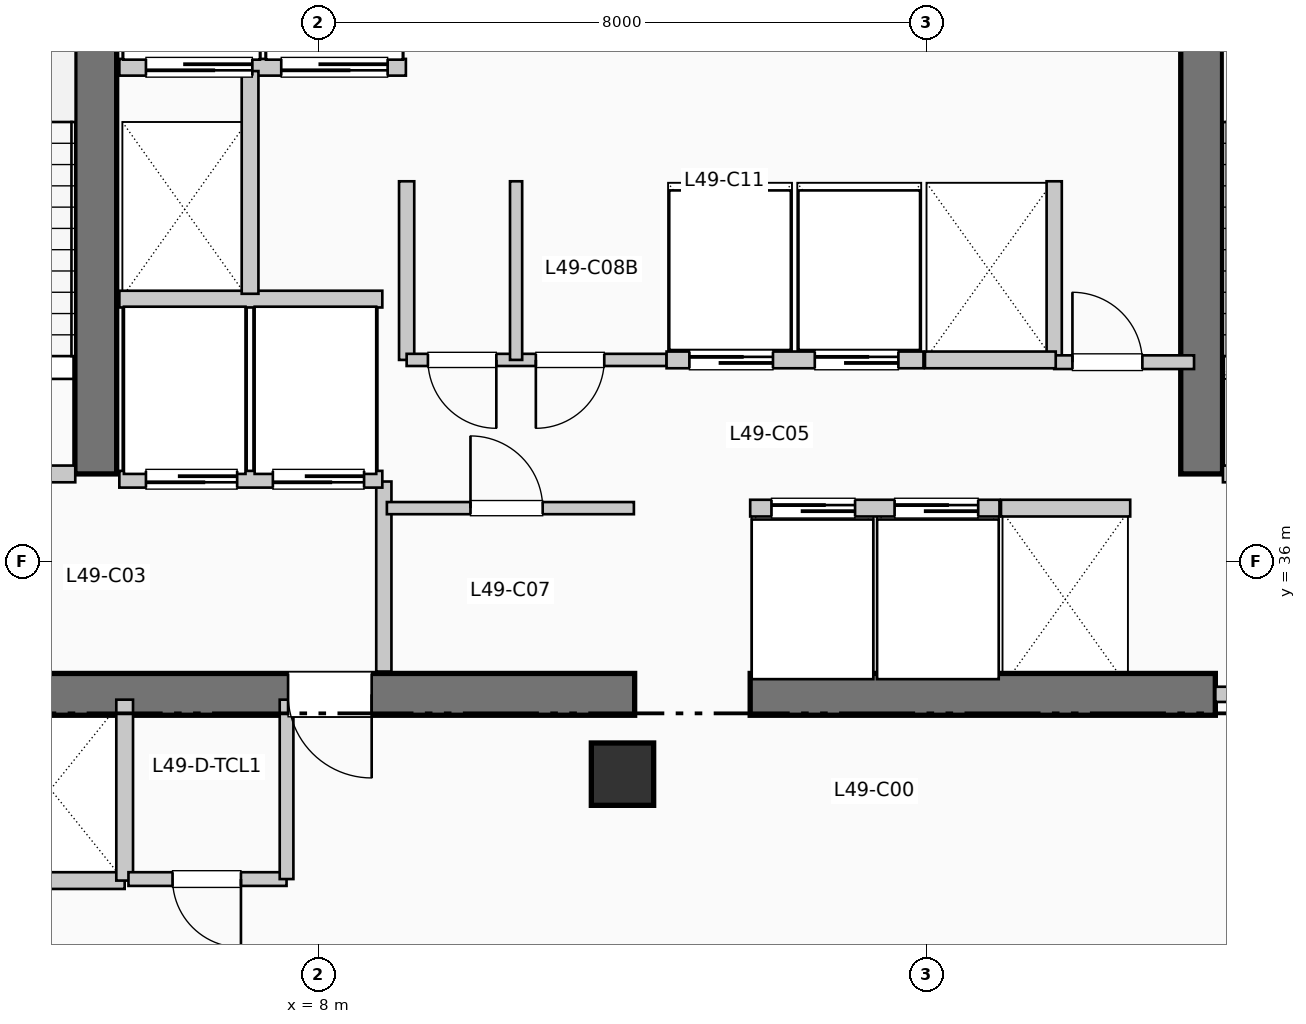
"""IFC4 building model, lengths in metres.
Left out: names, types, materials, properties, quantities, classifications, styles, units other than length and angle.
Written with IfcOpenShell. Run it as: python <this file> out.ifc"""

import sys

from ifc_helpers import new_model, si_unit, direction, frame, frame_2d, origin, origin_2d, place, context, subcontext, project, spatial, rectangle, extrude, element, fill, save


model = new_model("IFC4")
c1 = context("Model", 3, precision=1e-05, world=origin(), true_north=direction((0.0, 1.0)))
c2 = subcontext(c1, "Body", "Model", "MODEL_VIEW")
j1 = project(units=[si_unit("LENGTHUNIT", "METRE"), si_unit("PLANEANGLEUNIT", "RADIAN")], contexts=[c1])
p1 = place(None, origin())
s1 = spatial("IfcSite", under=j1, at=p1, CompositionType="ELEMENT")
p2 = place(p1, origin())
s2 = spatial("IfcBuilding", under=s1, at=p2, CompositionType="ELEMENT")
p3 = place(p2, frame((0.0, 0.0, 203.28)))
s3 = spatial("IfcBuildingStorey", under=s2, at=p3, CompositionType="ELEMENT", Elevation=203.28)
p4 = place(p3, frame((1.45, 34.25, 0.0), z_axis=(0.0, 0.0, 1.0), x_axis=(1.0, 0.0, 0.0)))
e1 = element("IfcWall", 1, at=p4, inside=s3, PredefinedType="SHEAR", context=c2, shape_type="SweptSolid", body=[
    extrude(rectangle(XDim=10.71, YDim=0.55, at=frame_2d((5.355, 0.0))), origin(), (0.0, 0.0, 1.0), 3.96),
])
p5 = place(p4, frame((7.25, 0.0, 0.0), z_axis=(0.0, 0.0, 1.0), x_axis=(-1.0, 0.0, 0.0)))
e2 = element("IfcOpeningElement", 2, at=p5, cuts=e1, PredefinedType="OPENING", context=c2, shape_type="SweptSolid", body=[
    extrude(rectangle(XDim=1.1, YDim=2.15, at=frame_2d((0.55, 1.075))), frame((0.0, 0.285, 0.0), z_axis=(0.0, -1.0, 0.0), x_axis=(1.0, 0.0, 0.0)), (0.0, 0.0, 1.0), 0.57),
])
p6 = place(p3, frame((13.68, 34.25, 0.0), z_axis=(0.0, 0.0, 1.0), x_axis=(1.0, 0.0, 0.0)))
e3 = element("IfcWall", 3, at=p6, inside=s3, PredefinedType="SHEAR", context=c2, shape_type="SweptSolid", body=[
    extrude(rectangle(XDim=6.12, YDim=0.55, at=frame_2d((3.06, 0.0))), origin(), (0.0, 0.0, 1.0), 3.96),
])
for number, where, z_axis, x_axis in (
    (4, (5.07, 37.15, 0.0), (0.0, 0.0, 1.0), (0.0, 1.0, 0.0)),
    (5, (19.62, 37.15, 0.0), (0.0, 0.0, 1.0), (0.0, 1.0, 0.0)),
):
    element("IfcWall", number, at=place(p3, frame(where, z_axis=z_axis, x_axis=x_axis)), inside=s3, PredefinedType="SHEAR", context=c2, shape_type="SweptSolid", body=[
        extrude(rectangle(XDim=7.89, YDim=0.55, at=frame_2d((3.945, 0.0))), origin(), (0.0, 0.0, 1.0), 3.96),
    ])
p7 = place(p3, frame((12.0, 33.2, 0.0), z_axis=(0.0, 0.0, 1.0), x_axis=(1.0, 0.0, 0.0)))
e6 = element("IfcColumn", 6, at=p7, inside=s3, PredefinedType="COLUMN", context=c2, shape_type="SweptSolid", body=[
    extrude(rectangle(XDim=0.82, YDim=0.82, at=origin_2d()), origin(), (0.0, 0.0, 1.0), 3.96),
])
p8 = place(p3, frame((1.65, 37.15, 0.0), z_axis=(0.0, 0.0, 1.0), x_axis=(1.0, 0.0, 0.0)))
e7 = element("IfcWall", 7, at=p8, inside=s3, PredefinedType="PARTITIONING", context=c2, shape_type="SweptSolid", body=[
    extrude(rectangle(XDim=3.15, YDim=0.22, at=frame_2d((1.575, 0.0))), origin(), (0.0, 0.0, 1.0), 3.71),
])
p9 = place(p8, frame((2.05, 0.0, 0.0), z_axis=(0.0, 0.0, 1.0), x_axis=(-1.0, 0.0, 0.0)))
e8 = element("IfcOpeningElement", 8, at=p9, cuts=e7, PredefinedType="OPENING", context=c2, shape_type="SweptSolid", body=[
    extrude(rectangle(XDim=1.05, YDim=2.15, at=frame_2d((0.525, 1.075))), frame((0.0, 0.12, 0.0), z_axis=(0.0, -1.0, 0.0), x_axis=(1.0, 0.0, 0.0)), (0.0, 0.0, 1.0), 0.24),
])
p10 = place(p3, frame((8.86, 34.55, 0.0), z_axis=(0.0, 0.0, 1.0), x_axis=(0.0, 1.0, 0.0)))
e9 = element("IfcWall", 9, at=p10, inside=s3, PredefinedType="PARTITIONING", context=c2, shape_type="SweptSolid", body=[
    extrude(rectangle(XDim=2.5, YDim=0.2, at=frame_2d((1.25, 0.0))), origin(), (0.0, 0.0, 1.0), 3.71),
])
p11 = place(p3, frame((19.9, 37.15, 0.0), z_axis=(0.0, 0.0, 1.0), x_axis=(1.0, 0.0, 0.0)))
e10 = element("IfcWall", 10, at=p11, inside=s3, PredefinedType="PARTITIONING", context=c2, shape_type="SweptSolid", body=[
    extrude(rectangle(XDim=3.15, YDim=0.22, at=frame_2d((1.575, 0.0))), origin(), (0.0, 0.0, 1.0), 3.71),
])
p12 = place(p11, frame((2.05, 0.0, 0.0), z_axis=(0.0, 0.0, 1.0), x_axis=(-1.0, 0.0, 0.0)))
e11 = element("IfcOpeningElement", 11, at=p12, cuts=e10, PredefinedType="OPENING", context=c2, shape_type="SweptSolid", body=[
    extrude(rectangle(XDim=1.05, YDim=2.15, at=frame_2d((0.525, 1.075))), frame((0.0, 0.12, 0.0), z_axis=(0.0, -1.0, 0.0), x_axis=(1.0, 0.0, 0.0)), (0.0, 0.0, 1.0), 0.24),
])
p13 = place(p3, frame((19.8, 34.25, 0.0), z_axis=(0.0, 0.0, 1.0), x_axis=(1.0, 0.0, 0.0)))
e12 = element("IfcWall", 12, at=p13, inside=s3, PredefinedType="PARTITIONING", context=c2, shape_type="SweptSolid", body=[
    extrude(rectangle(XDim=3.25, YDim=0.2, at=frame_2d((1.625, 0.0))), origin(), (0.0, 0.0, 1.0), 3.71),
])
p14 = place(p13, frame((2.15, 0.0, 0.0), z_axis=(0.0, 0.0, 1.0), x_axis=(-1.0, 0.0, 0.0)))
e13 = element("IfcOpeningElement", 13, at=p14, cuts=e12, PredefinedType="OPENING", context=c2, shape_type="SweptSolid", body=[
    extrude(rectangle(XDim=1.1, YDim=2.15, at=frame_2d((0.55, 1.075))), frame((0.0, 0.11, 0.0), z_axis=(0.0, -1.0, 0.0), x_axis=(1.0, 0.0, 0.0)), (0.0, 0.0, 1.0), 0.22),
])
p15 = place(p3, frame((5.38, 37.08, 0.0), z_axis=(0.0, 0.0, 1.0), x_axis=(1.0, 0.0, 0.0)))
e14 = element("IfcWall", 14, at=p15, inside=s3, PredefinedType="PARTITIONING", context=c2, shape_type="SweptSolid", body=[
    extrude(rectangle(XDim=3.46, YDim=0.22, at=frame_2d((1.73, 0.0))), origin(), (0.0, 0.0, 1.0), 3.71),
])
p16 = place(p15, frame((1.55, 0.0, 0.0), z_axis=(0.0, 0.0, 1.0), x_axis=(-1.0, 0.0, 0.0)))
e15 = element("IfcOpeningElement", 15, at=p16, cuts=e14, PredefinedType="OPENING", context=c2, shape_type="SweptSolid", body=[
    extrude(rectangle(XDim=1.2, YDim=2.2, at=frame_2d((0.6, 1.1))), frame((0.0, 0.12, 0.0), z_axis=(0.0, -1.0, 0.0), x_axis=(1.0, 0.0, 0.0)), (0.0, 0.0, 1.0), 0.24),
])
p17 = place(p15, frame((3.22, 0.0, 0.0), z_axis=(0.0, 0.0, 1.0), x_axis=(-1.0, 0.0, 0.0)))
e16 = element("IfcOpeningElement", 16, at=p17, cuts=e14, PredefinedType="OPENING", context=c2, shape_type="SweptSolid", body=[
    extrude(rectangle(XDim=1.2, YDim=2.2, at=frame_2d((0.6, 1.1))), frame((0.0, 0.12, 0.0), z_axis=(0.0, -1.0, 0.0), x_axis=(1.0, 0.0, 0.0)), (0.0, 0.0, 1.0), 0.24),
])
p18 = place(p3, frame((5.38, 39.45, 0.0), z_axis=(0.0, 0.0, 1.0), x_axis=(1.0, 0.0, 0.0)))
e17 = element("IfcWall", 17, at=p18, inside=s3, PredefinedType="PARTITIONING", context=c2, shape_type="SweptSolid", body=[
    extrude(rectangle(XDim=3.46, YDim=0.22, at=frame_2d((1.73, 0.0))), origin(), (0.0, 0.0, 1.0), 3.71),
])
p19 = place(p3, frame((5.38, 42.5, 0.0), z_axis=(0.0, 0.0, 1.0), x_axis=(1.0, 0.0, 0.0)))
e18 = element("IfcWall", 18, at=p19, inside=s3, PredefinedType="PARTITIONING", context=c2, shape_type="SweptSolid", body=[
    extrude(rectangle(XDim=3.77, YDim=0.22, at=frame_2d((1.885, 0.0))), origin(), (0.0, 0.0, 1.0), 3.71),
])
p20 = place(p19, frame((1.75, 0.0, 0.0), z_axis=(0.0, 0.0, 1.0), x_axis=(-1.0, 0.0, 0.0)))
e19 = element("IfcOpeningElement", 19, at=p20, cuts=e18, PredefinedType="OPENING", context=c2, shape_type="SweptSolid", body=[
    extrude(rectangle(XDim=1.4, YDim=2.2, at=frame_2d((0.7, 1.1))), frame((0.0, 0.12, 0.0), z_axis=(0.0, -1.0, 0.0), x_axis=(1.0, 0.0, 0.0)), (0.0, 0.0, 1.0), 0.24),
])
p21 = place(p19, frame((3.53, 0.0, 0.0), z_axis=(0.0, 0.0, 1.0), x_axis=(-1.0, 0.0, 0.0)))
e20 = element("IfcOpeningElement", 20, at=p21, cuts=e18, PredefinedType="OPENING", context=c2, shape_type="SweptSolid", body=[
    extrude(rectangle(XDim=1.4, YDim=2.2, at=frame_2d((0.7, 1.1))), frame((0.0, 0.12, 0.0), z_axis=(0.0, -1.0, 0.0), x_axis=(1.0, 0.0, 0.0)), (0.0, 0.0, 1.0), 0.24),
])
p22 = place(p3, frame((7.1, 39.52, 0.0), z_axis=(0.0, 0.0, 1.0), x_axis=(0.0, 1.0, 0.0)))
e21 = element("IfcWall", 21, at=p22, inside=s3, PredefinedType="PARTITIONING", context=c2, shape_type="SweptSolid", body=[
    extrude(rectangle(XDim=2.93, YDim=0.22, at=frame_2d((1.465, 0.0))), origin(), (0.0, 0.0, 1.0), 3.71),
])
p23 = place(p3, frame((1.55, 31.8, 0.0), z_axis=(0.0, 0.0, 1.0), x_axis=(1.0, 0.0, 0.0)))
e22 = element("IfcWall", 22, at=p23, inside=s3, PredefinedType="PARTITIONING", context=c2, shape_type="SweptSolid", body=[
    extrude(rectangle(XDim=3.9, YDim=0.22, at=frame_2d((1.95, 0.0))), origin(), (0.0, 0.0, 1.0), 3.71),
])
p24 = place(p3, frame((5.45, 31.8, 0.0), z_axis=(0.0, 0.0, 1.0), x_axis=(0.0, 1.0, 0.0)))
e23 = element("IfcWall", 23, at=p24, inside=s3, PredefinedType="PARTITIONING", context=c2, shape_type="SweptSolid", body=[
    extrude(rectangle(XDim=2.38, YDim=0.22, at=frame_2d((1.19, 0.0))), origin(), (0.0, 0.0, 1.0), 3.71),
])
for number, where, z_axis, x_axis in (
    (24, (9.16, 38.65, 0.0), (0.0, 0.0, 1.0), (0.0, 1.0, 0.0)),
    (25, (17.68, 38.65, 0.0), (0.0, 0.0, 1.0), (0.0, 1.0, 0.0)),
):
    element("IfcWall", number, at=place(p3, frame(where, z_axis=z_axis, x_axis=x_axis)), inside=s3, PredefinedType="PARTITIONING", context=c2, shape_type="SweptSolid", body=[
        extrude(rectangle(XDim=2.35, YDim=0.2, at=frame_2d((1.175, 0.0))), origin(), (0.0, 0.0, 1.0), 3.71),
    ])
p25 = place(p3, frame((17.68, 38.62, 0.0), z_axis=(0.0, 0.0, 1.0), x_axis=(1.0, 0.0, 0.0)))
e26 = element("IfcWall", 26, at=p25, inside=s3, PredefinedType="PARTITIONING", context=c2, shape_type="SweptSolid", body=[
    extrude(rectangle(XDim=1.84, YDim=0.18, at=frame_2d((0.92, 0.0))), origin(), (0.0, 0.0, 1.0), 3.71),
])
p26 = place(p25, frame((0.24, 0.0, 0.0)))
e27 = element("IfcOpeningElement", 27, at=p26, cuts=e26, PredefinedType="OPENING", context=c2, shape_type="SweptSolid", body=[
    extrude(rectangle(XDim=0.92, YDim=2.1, at=frame_2d((0.46, 1.05))), frame((0.0, 0.1, 0.0), z_axis=(0.0, -1.0, 0.0), x_axis=(1.0, 0.0, 0.0)), (0.0, 0.0, 1.0), 0.2),
])
p27 = place(p3, frame((5.5, 31.82, 0.0), z_axis=(0.0, 0.0, 1.0), x_axis=(1.0, 0.0, 0.0)))
e28 = element("IfcWall", 28, at=p27, inside=s3, PredefinedType="PLUMBINGWALL", context=c2, shape_type="SweptSolid", body=[
    extrude(rectangle(XDim=2.08, YDim=0.18, at=frame_2d((1.04, 0.0))), origin(), (0.0, 0.0, 1.0), 3.71),
])
p28 = place(p27, frame((1.48, 0.0, 0.0), z_axis=(0.0, 0.0, 1.0), x_axis=(-1.0, 0.0, 0.0)))
e29 = element("IfcOpeningElement", 29, at=p28, cuts=e28, PredefinedType="OPENING", context=c2, shape_type="SweptSolid", body=[
    extrude(rectangle(XDim=0.9, YDim=2.1, at=frame_2d((0.45, 1.05))), frame((0.0, 0.1, 0.0), z_axis=(0.0, -1.0, 0.0), x_axis=(1.0, 0.0, 0.0)), (0.0, 0.0, 1.0), 0.2),
])
p29 = place(p3, frame((7.58, 31.82, 0.0), z_axis=(0.0, 0.0, 1.0), x_axis=(0.0, 1.0, 0.0)))
e30 = element("IfcWall", 30, at=p29, inside=s3, PredefinedType="PLUMBINGWALL", context=c2, shape_type="SweptSolid", body=[
    extrude(rectangle(XDim=2.36, YDim=0.18, at=frame_2d((1.18, 0.0))), origin(), (0.0, 0.0, 1.0), 3.71),
])
p30 = place(p3, frame((8.9, 36.7, 0.0), z_axis=(0.0, 0.0, 1.0), x_axis=(1.0, 0.0, 0.0)))
e31 = element("IfcWall", 31, at=p30, inside=s3, PredefinedType="PARTITIONING", context=c2, shape_type="SweptSolid", body=[
    extrude(rectangle(XDim=3.25, YDim=0.16, at=frame_2d((1.625, 0.0))), origin(), (0.0, 0.0, 1.0), 3.71),
])
p31 = place(p30, frame((1.1, 0.0, 0.0)))
e32 = element("IfcOpeningElement", 32, at=p31, cuts=e31, PredefinedType="OPENING", context=c2, shape_type="SweptSolid", body=[
    extrude(rectangle(XDim=0.95, YDim=2.15, at=frame_2d((0.475, 1.075))), frame((0.0, 0.09, 0.0), z_axis=(0.0, -1.0, 0.0), x_axis=(1.0, 0.0, 0.0)), (0.0, 0.0, 1.0), 0.18),
])
p32 = place(p3, frame((9.16, 38.65, 0.0), z_axis=(0.0, 0.0, 1.0), x_axis=(1.0, 0.0, 0.0)))
e33 = element("IfcWall", 33, at=p32, inside=s3, PredefinedType="PARTITIONING", context=c2, shape_type="SweptSolid", body=[
    extrude(rectangle(XDim=3.42, YDim=0.16, at=frame_2d((1.71, 0.0))), origin(), (0.0, 0.0, 1.0), 3.71),
])
p33 = place(p32, frame((1.18, 0.0, 0.0), z_axis=(0.0, 0.0, 1.0), x_axis=(-1.0, 0.0, 0.0)))
e34 = element("IfcOpeningElement", 34, at=p33, cuts=e33, PredefinedType="OPENING", context=c2, shape_type="SweptSolid", body=[
    extrude(rectangle(XDim=0.9, YDim=2.15, at=frame_2d((0.45, 1.075))), frame((0.0, 0.09, 0.0), z_axis=(0.0, -1.0, 0.0), x_axis=(1.0, 0.0, 0.0)), (0.0, 0.0, 1.0), 0.18),
])
p34 = place(p32, frame((2.6, 0.0, 0.0), z_axis=(0.0, 0.0, 1.0), x_axis=(-1.0, 0.0, 0.0)))
e35 = element("IfcOpeningElement", 35, at=p34, cuts=e33, PredefinedType="OPENING", context=c2, shape_type="SweptSolid", body=[
    extrude(rectangle(XDim=0.9, YDim=2.15, at=frame_2d((0.45, 1.075))), frame((0.0, 0.09, 0.0), z_axis=(0.0, -1.0, 0.0), x_axis=(1.0, 0.0, 0.0)), (0.0, 0.0, 1.0), 0.18),
])
p35 = place(p3, frame((10.6, 38.65, 0.0), z_axis=(0.0, 0.0, 1.0), x_axis=(0.0, 1.0, 0.0)))
e36 = element("IfcWall", 36, at=p35, inside=s3, PredefinedType="PARTITIONING", context=c2, shape_type="SweptSolid", body=[
    extrude(rectangle(XDim=2.35, YDim=0.16, at=frame_2d((1.175, 0.0))), origin(), (0.0, 0.0, 1.0), 3.71),
])
p36 = place(p3, frame((13.68, 36.7, 0.0), z_axis=(0.0, 0.0, 1.0), x_axis=(1.0, 0.0, 0.0)))
e37 = element("IfcWall", 37, at=p36, inside=s3, PredefinedType="PARTITIONING", context=c2, shape_type="SweptSolid", body=[
    extrude(rectangle(XDim=3.28, YDim=0.22, at=frame_2d((1.64, 0.0))), origin(), (0.0, 0.0, 1.0), 3.71),
])
p37 = place(p36, frame((0.28, 0.0, 0.0)))
e38 = element("IfcOpeningElement", 38, at=p37, cuts=e37, PredefinedType="OPENING", context=c2, shape_type="SweptSolid", body=[
    extrude(rectangle(XDim=1.1, YDim=2.2, at=frame_2d((0.55, 1.1))), frame((0.0, 0.12, 0.0), z_axis=(0.0, -1.0, 0.0), x_axis=(1.0, 0.0, 0.0)), (0.0, 0.0, 1.0), 0.24),
])
p38 = place(p36, frame((1.9, 0.0, 0.0)))
e39 = element("IfcOpeningElement", 39, at=p38, cuts=e37, PredefinedType="OPENING", context=c2, shape_type="SweptSolid", body=[
    extrude(rectangle(XDim=1.1, YDim=2.2, at=frame_2d((0.55, 1.1))), frame((0.0, 0.12, 0.0), z_axis=(0.0, -1.0, 0.0), x_axis=(1.0, 0.0, 0.0)), (0.0, 0.0, 1.0), 0.24),
])
p39 = place(p3, frame((12.58, 38.65, 0.0), z_axis=(0.0, 0.0, 1.0), x_axis=(1.0, 0.0, 0.0)))
e40 = element("IfcWall", 40, at=p39, inside=s3, PredefinedType="PARTITIONING", context=c2, shape_type="SweptSolid", body=[
    extrude(rectangle(XDim=3.38, YDim=0.22, at=frame_2d((1.69, 0.0))), origin(), (0.0, 0.0, 1.0), 3.71),
])
p40 = place(p39, frame((0.3, 0.0, 0.0)))
e41 = element("IfcOpeningElement", 41, at=p40, cuts=e40, PredefinedType="OPENING", context=c2, shape_type="SweptSolid", body=[
    extrude(rectangle(XDim=1.1, YDim=2.2, at=frame_2d((0.55, 1.1))), frame((0.0, 0.12, 0.0), z_axis=(0.0, -1.0, 0.0), x_axis=(1.0, 0.0, 0.0)), (0.0, 0.0, 1.0), 0.24),
])
p41 = place(p39, frame((1.95, 0.0, 0.0)))
e42 = element("IfcOpeningElement", 42, at=p41, cuts=e40, PredefinedType="OPENING", context=c2, shape_type="SweptSolid", body=[
    extrude(rectangle(XDim=1.1, YDim=2.2, at=frame_2d((0.55, 1.1))), frame((0.0, 0.12, 0.0), z_axis=(0.0, -1.0, 0.0), x_axis=(1.0, 0.0, 0.0)), (0.0, 0.0, 1.0), 0.24),
])
p42 = place(p3, frame((16.98, 36.7, 0.0), z_axis=(0.0, 0.0, 1.0), x_axis=(1.0, 0.0, 0.0)))
e43 = element("IfcWall", 43, at=p42, inside=s3, PredefinedType="PARTITIONING", context=c2, shape_type="SweptSolid", body=[
    extrude(rectangle(XDim=1.7, YDim=0.22, at=frame_2d((0.85, 0.0))), origin(), (0.0, 0.0, 1.0), 3.71),
])
p43 = place(p3, frame((15.98, 38.65, 0.0), z_axis=(0.0, 0.0, 1.0), x_axis=(1.0, 0.0, 0.0)))
e44 = element("IfcWall", 44, at=p43, inside=s3, PredefinedType="PARTITIONING", context=c2, shape_type="SweptSolid", body=[
    extrude(rectangle(XDim=1.72, YDim=0.22, at=frame_2d((0.86, 0.0))), origin(), (0.0, 0.0, 1.0), 3.71),
])
p44 = place(p5, origin())
e45 = element("IfcDoor", 45, at=p44, inside=s3, OperationType="SINGLE_SWING_RIGHT", PredefinedType="DOOR", context=c2, shape_type="SweptSolid", body=[
    extrude(rectangle(XDim=1.1, YDim=2.15, at=frame_2d((0.55, 1.075))), frame((0.0, 0.025, 0.0), z_axis=(0.0, -1.0, 0.0), x_axis=(1.0, 0.0, 0.0)), (0.0, 0.0, 1.0), 0.05),
])
fill(e2, e45)
p45 = place(p16, origin())
e46 = element("IfcDoor", 46, at=p45, inside=s3, OperationType="SLIDING_TO_RIGHT", PredefinedType="DOOR", context=c2, shape_type="SweptSolid", body=[
    extrude(rectangle(XDim=1.2, YDim=2.2, at=frame_2d((0.6, 1.1))), frame((0.0, 0.025, 0.0), z_axis=(0.0, -1.0, 0.0), x_axis=(1.0, 0.0, 0.0)), (0.0, 0.0, 1.0), 0.05),
])
fill(e15, e46)
p46 = place(p17, origin())
e47 = element("IfcDoor", 47, at=p46, inside=s3, OperationType="SLIDING_TO_RIGHT", PredefinedType="DOOR", context=c2, shape_type="SweptSolid", body=[
    extrude(rectangle(XDim=1.2, YDim=2.2, at=frame_2d((0.6, 1.1))), frame((0.0, 0.025, 0.0), z_axis=(0.0, -1.0, 0.0), x_axis=(1.0, 0.0, 0.0)), (0.0, 0.0, 1.0), 0.05),
])
fill(e16, e47)
p47 = place(p20, origin())
e48 = element("IfcDoor", 48, at=p47, inside=s3, OperationType="SLIDING_TO_LEFT", PredefinedType="DOOR", context=c2, shape_type="SweptSolid", body=[
    extrude(rectangle(XDim=1.4, YDim=2.2, at=frame_2d((0.7, 1.1))), frame((0.0, 0.025, 0.0), z_axis=(0.0, -1.0, 0.0), x_axis=(1.0, 0.0, 0.0)), (0.0, 0.0, 1.0), 0.05),
])
fill(e19, e48)
p48 = place(p21, origin())
e49 = element("IfcDoor", 49, at=p48, inside=s3, OperationType="SLIDING_TO_LEFT", PredefinedType="DOOR", context=c2, shape_type="SweptSolid", body=[
    extrude(rectangle(XDim=1.4, YDim=2.2, at=frame_2d((0.7, 1.1))), frame((0.0, 0.025, 0.0), z_axis=(0.0, -1.0, 0.0), x_axis=(1.0, 0.0, 0.0)), (0.0, 0.0, 1.0), 0.05),
])
fill(e20, e49)
p49 = place(p26, origin())
e50 = element("IfcDoor", 50, at=p49, inside=s3, OperationType="SINGLE_SWING_LEFT", PredefinedType="DOOR", context=c2, shape_type="SweptSolid", body=[
    extrude(rectangle(XDim=0.92, YDim=2.1, at=frame_2d((0.46, 1.05))), frame((0.0, 0.025, 0.0), z_axis=(0.0, -1.0, 0.0), x_axis=(1.0, 0.0, 0.0)), (0.0, 0.0, 1.0), 0.05),
])
fill(e27, e50)
p50 = place(p28, origin())
e51 = element("IfcDoor", 51, at=p50, inside=s3, OperationType="SINGLE_SWING_RIGHT", PredefinedType="DOOR", context=c2, shape_type="SweptSolid", body=[
    extrude(rectangle(XDim=0.9, YDim=2.1, at=frame_2d((0.45, 1.05))), frame((0.0, 0.025, 0.0), z_axis=(0.0, -1.0, 0.0), x_axis=(1.0, 0.0, 0.0)), (0.0, 0.0, 1.0), 0.05),
])
fill(e29, e51)
p51 = place(p31, origin())
e52 = element("IfcDoor", 52, at=p51, inside=s3, OperationType="SINGLE_SWING_LEFT", PredefinedType="DOOR", context=c2, shape_type="SweptSolid", body=[
    extrude(rectangle(XDim=0.95, YDim=2.15, at=frame_2d((0.475, 1.075))), frame((0.0, 0.025, 0.0), z_axis=(0.0, -1.0, 0.0), x_axis=(1.0, 0.0, 0.0)), (0.0, 0.0, 1.0), 0.05),
])
fill(e32, e52)
p52 = place(p33, origin())
e53 = element("IfcDoor", 53, at=p52, inside=s3, OperationType="SINGLE_SWING_RIGHT", PredefinedType="DOOR", context=c2, shape_type="SweptSolid", body=[
    extrude(rectangle(XDim=0.9, YDim=2.15, at=frame_2d((0.45, 1.075))), frame((0.0, 0.025, 0.0), z_axis=(0.0, -1.0, 0.0), x_axis=(1.0, 0.0, 0.0)), (0.0, 0.0, 1.0), 0.05),
])
fill(e34, e53)
p53 = place(p34, origin())
e54 = element("IfcDoor", 54, at=p53, inside=s3, OperationType="SINGLE_SWING_LEFT", PredefinedType="DOOR", context=c2, shape_type="SweptSolid", body=[
    extrude(rectangle(XDim=0.9, YDim=2.15, at=frame_2d((0.45, 1.075))), frame((0.0, 0.025, 0.0), z_axis=(0.0, -1.0, 0.0), x_axis=(1.0, 0.0, 0.0)), (0.0, 0.0, 1.0), 0.05),
])
fill(e35, e54)
p54 = place(p37, origin())
e55 = element("IfcDoor", 55, at=p54, inside=s3, OperationType="SLIDING_TO_RIGHT", PredefinedType="DOOR", context=c2, shape_type="SweptSolid", body=[
    extrude(rectangle(XDim=1.1, YDim=2.2, at=frame_2d((0.55, 1.1))), frame((0.0, 0.025, 0.0), z_axis=(0.0, -1.0, 0.0), x_axis=(1.0, 0.0, 0.0)), (0.0, 0.0, 1.0), 0.05),
])
fill(e38, e55)
p55 = place(p38, origin())
e56 = element("IfcDoor", 56, at=p55, inside=s3, OperationType="SLIDING_TO_RIGHT", PredefinedType="DOOR", context=c2, shape_type="SweptSolid", body=[
    extrude(rectangle(XDim=1.1, YDim=2.2, at=frame_2d((0.55, 1.1))), frame((0.0, 0.025, 0.0), z_axis=(0.0, -1.0, 0.0), x_axis=(1.0, 0.0, 0.0)), (0.0, 0.0, 1.0), 0.05),
])
fill(e39, e56)
p56 = place(p40, origin())
e57 = element("IfcDoor", 57, at=p56, inside=s3, OperationType="SLIDING_TO_RIGHT", PredefinedType="DOOR", context=c2, shape_type="SweptSolid", body=[
    extrude(rectangle(XDim=1.1, YDim=2.2, at=frame_2d((0.55, 1.1))), frame((0.0, 0.025, 0.0), z_axis=(0.0, -1.0, 0.0), x_axis=(1.0, 0.0, 0.0)), (0.0, 0.0, 1.0), 0.05),
])
fill(e41, e57)
p57 = place(p41, origin())
e58 = element("IfcDoor", 58, at=p57, inside=s3, OperationType="SLIDING_TO_RIGHT", PredefinedType="DOOR", context=c2, shape_type="SweptSolid", body=[
    extrude(rectangle(XDim=1.1, YDim=2.2, at=frame_2d((0.55, 1.1))), frame((0.0, 0.025, 0.0), z_axis=(0.0, -1.0, 0.0), x_axis=(1.0, 0.0, 0.0)), (0.0, 0.0, 1.0), 0.05),
])
fill(e42, e58)
save(model, sys.argv[1])
